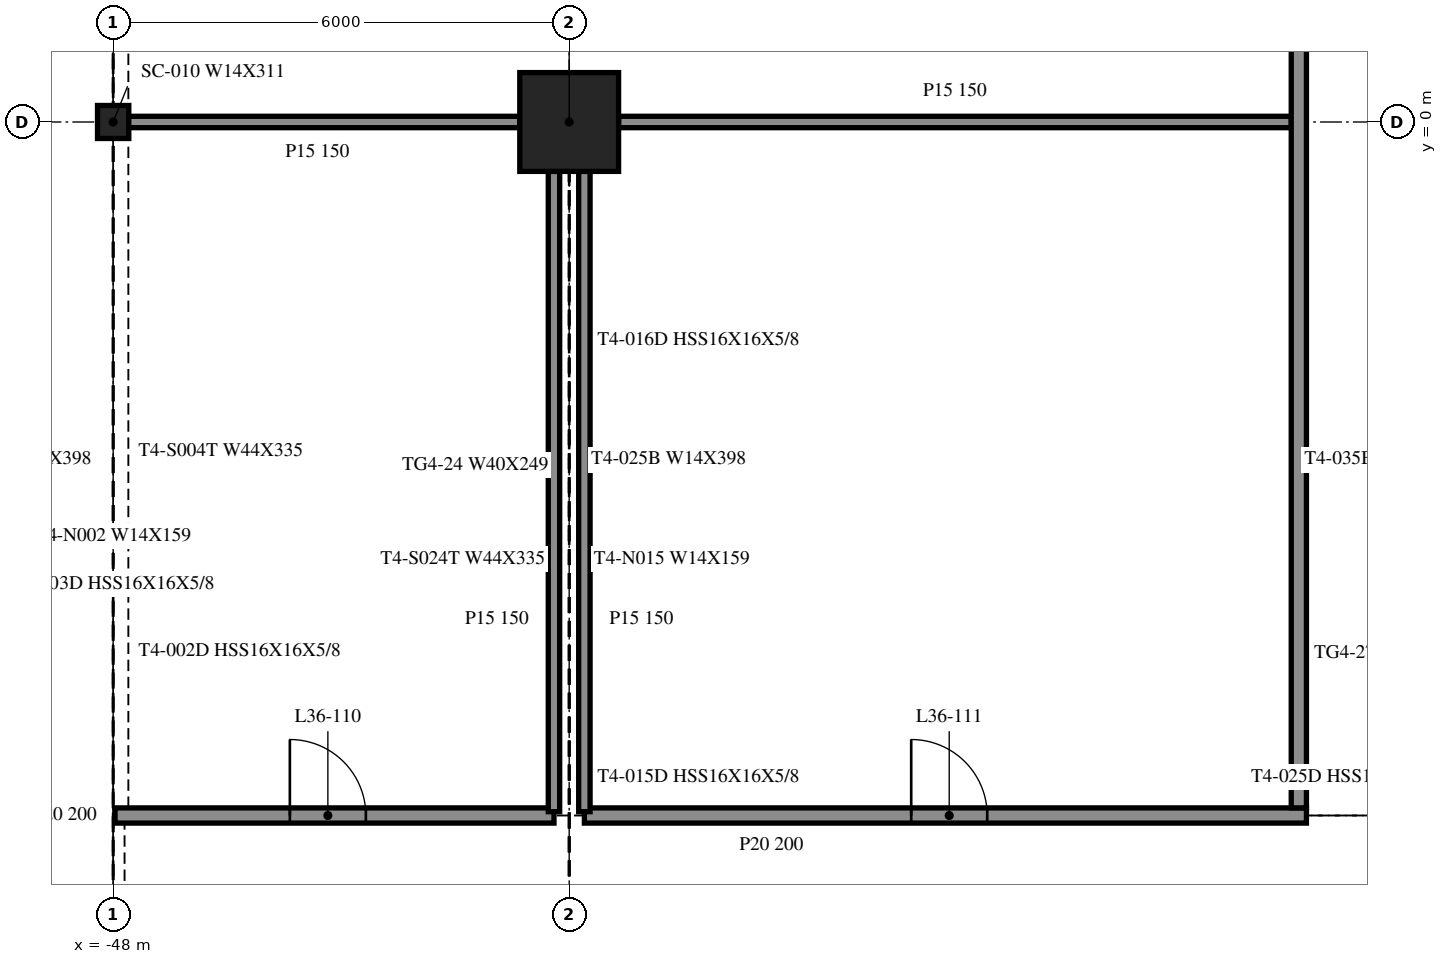
"""IFC4 building model, lengths in metres.
Left out: names, types, materials, properties, quantities, classifications, styles, units other than length and angle.
Written with IfcOpenShell. Run it as: python <this file> out.ifc"""

import sys

from ifc_helpers import new_model, si_unit, direction, frame, frame_2d, origin, origin_2d, place, context, subcontext, project, spatial, rectangle, i_section, extrude, element, fill, save


model = new_model("IFC4")
c1 = context("Model", 3, precision=1e-05, world=origin(), true_north=direction((0.0, 1.0)))
c2 = subcontext(c1, "Body", "Model", "MODEL_VIEW")
j1 = project(units=[si_unit("LENGTHUNIT", "METRE"), si_unit("PLANEANGLEUNIT", "RADIAN")], contexts=[c1])
p1 = place(None, origin())
s1 = spatial("IfcSite", under=j1, at=p1, CompositionType="ELEMENT")
p2 = place(p1, origin())
s2 = spatial("IfcBuilding", under=s1, at=p2, CompositionType="ELEMENT")
p3 = place(p2, frame((0.0, 0.0, 154.8)))
s3 = spatial("IfcBuildingStorey", under=s2, at=p3, CompositionType="ELEMENT", Elevation=154.8)
p4 = place(p3, frame((-42.0, 0.0, -0.55), z_axis=(0.0, 0.0, 1.0), x_axis=(1.0, 0.0, 0.0)))
e1 = element("IfcColumn", 1, at=p4, inside=s3, PredefinedType="COLUMN", context=c2, shape_type="SweptSolid", body=[
    extrude(rectangle(XDim=1.3, YDim=1.3, at=origin_2d()), origin(), (0.0, 0.0, 1.0), 4.61),
])
p5 = place(p3, frame((-48.0, 0.0, -0.55), z_axis=(0.0, 0.0, 1.0), x_axis=(1.0, 0.0, 0.0)))
e2 = element("IfcColumn", 2, at=p5, inside=s3, PredefinedType="COLUMN", context=c2, shape_type="SweptSolid", body=[
    extrude(i_section(OverallWidth=0.412, OverallDepth=0.434, WebThickness=0.036, FlangeThickness=0.057, at=origin_2d()), origin(), (0.0, 0.0, 1.0), 4.61),
])
p6 = place(p3, frame((-47.975, -9.125, 0.0), z_axis=(0.0, 0.0, 1.0), x_axis=(1.0, 0.0, 0.0)))
e3 = element("IfcWall", 3, at=p6, inside=s3, PredefinedType="PARTITIONING", context=c2, shape_type="SweptSolid", body=[
    extrude(rectangle(XDim=5.775, YDim=0.2, at=frame_2d((2.888, 0.0))), origin(), (0.0, 0.0, 1.0), 4.06),
])
p7 = place(p6, frame((2.3, 0.0, 0.0)))
e4 = element("IfcOpeningElement", 4, at=p7, cuts=e3, PredefinedType="OPENING", context=c2, shape_type="SweptSolid", body=[
    extrude(rectangle(XDim=1.0, YDim=2.1, at=frame_2d((0.5, 1.05))), frame((0.0, 0.11, 0.0), z_axis=(0.0, -1.0, 0.0), x_axis=(1.0, 0.0, 0.0)), (0.0, 0.0, 1.0), 0.22),
])
p8 = place(p3, frame((-41.8, -9.125, 0.0), z_axis=(0.0, 0.0, 1.0), x_axis=(1.0, 0.0, 0.0)))
e5 = element("IfcWall", 5, at=p8, inside=s3, PredefinedType="PARTITIONING", context=c2, shape_type="SweptSolid", body=[
    extrude(rectangle(XDim=9.5, YDim=0.2, at=frame_2d((4.75, 0.0))), origin(), (0.0, 0.0, 1.0), 4.06),
])
p9 = place(p8, frame((4.3, 0.0, 0.0)))
e6 = element("IfcOpeningElement", 6, at=p9, cuts=e5, PredefinedType="OPENING", context=c2, shape_type="SweptSolid", body=[
    extrude(rectangle(XDim=1.0, YDim=2.1, at=frame_2d((0.5, 1.05))), frame((0.0, 0.11, 0.0), z_axis=(0.0, -1.0, 0.0), x_axis=(1.0, 0.0, 0.0)), (0.0, 0.0, 1.0), 0.22),
])
p10 = place(p3, frame((-47.975, 0.0, 0.0), z_axis=(0.0, 0.0, 1.0), x_axis=(1.0, 0.0, 0.0)))
e7 = element("IfcWall", 7, at=p10, inside=s3, PredefinedType="PARTITIONING", context=c2, shape_type="SweptSolid", body=[
    extrude(rectangle(XDim=5.325, YDim=0.15, at=frame_2d((2.663, 0.0))), origin(), (0.0, 0.0, 1.0), 4.06),
])
p11 = place(p3, frame((-41.35, 0.0, 0.0), z_axis=(0.0, 0.0, 1.0), x_axis=(1.0, 0.0, 0.0)))
e8 = element("IfcWall", 8, at=p11, inside=s3, PredefinedType="PARTITIONING", context=c2, shape_type="SweptSolid", body=[
    extrude(rectangle(XDim=8.85, YDim=0.15, at=frame_2d((4.425, 0.0))), origin(), (0.0, 0.0, 1.0), 4.06),
])
for number, where, z_axis, x_axis in (
    (9, (-42.2, -9.075, 0.0), (0.0, 0.0, 1.0), (0.0, 1.0, 0.0)),
    (10, (-41.8, -9.075, 0.0), (0.0, 0.0, 1.0), (0.0, 1.0, 0.0)),
):
    element("IfcWall", number, at=place(p3, frame(where, z_axis=z_axis, x_axis=x_axis)), inside=s3, PredefinedType="PARTITIONING", context=c2, shape_type="SweptSolid", body=[
        extrude(rectangle(XDim=8.425, YDim=0.15, at=frame_2d((4.212, 0.0))), origin(), (0.0, 0.0, 1.0), 4.06),
    ])
p12 = place(p3, frame((-32.4, -9.025, 0.0), z_axis=(0.0, 0.0, 1.0), x_axis=(0.0, 1.0, 0.0)))
e11 = element("IfcWall", 11, at=p12, inside=s3, PredefinedType="PARTITIONING", context=c2, shape_type="SweptSolid", body=[
    extrude(rectangle(XDim=24.05, YDim=0.2, at=frame_2d((12.025, 0.0))), origin(), (0.0, 0.0, 1.0), 4.06),
])
p13 = place(p12, frame((11.5, 0.0, 0.0)))
e12 = element("IfcOpeningElement", 12, at=p13, cuts=e11, PredefinedType="OPENING", context=c2, shape_type="SweptSolid", body=[
    extrude(rectangle(XDim=0.9, YDim=2.1, at=frame_2d((0.45, 1.05))), frame((0.0, 0.11, 0.0), z_axis=(0.0, -1.0, 0.0), x_axis=(1.0, 0.0, 0.0)), (0.0, 0.0, 1.0), 0.22),
])
p14 = place(p7, origin())
e13 = element("IfcDoor", 13, at=p14, inside=s3, OperationType="SINGLE_SWING_LEFT", PredefinedType="DOOR", context=c2, shape_type="SweptSolid", body=[
    extrude(rectangle(XDim=1.0, YDim=2.1, at=frame_2d((0.5, 1.05))), frame((0.0, 0.025, 0.0), z_axis=(0.0, -1.0, 0.0), x_axis=(1.0, 0.0, 0.0)), (0.0, 0.0, 1.0), 0.05),
])
fill(e4, e13)
p15 = place(p9, origin())
e14 = element("IfcDoor", 14, at=p15, inside=s3, OperationType="SINGLE_SWING_RIGHT", PredefinedType="DOOR", context=c2, shape_type="SweptSolid", body=[
    extrude(rectangle(XDim=1.0, YDim=2.1, at=frame_2d((0.5, 1.05))), frame((0.0, 0.025, 0.0), z_axis=(0.0, -1.0, 0.0), x_axis=(1.0, 0.0, 0.0)), (0.0, 0.0, 1.0), 0.05),
])
fill(e6, e14)
save(model, sys.argv[1])
